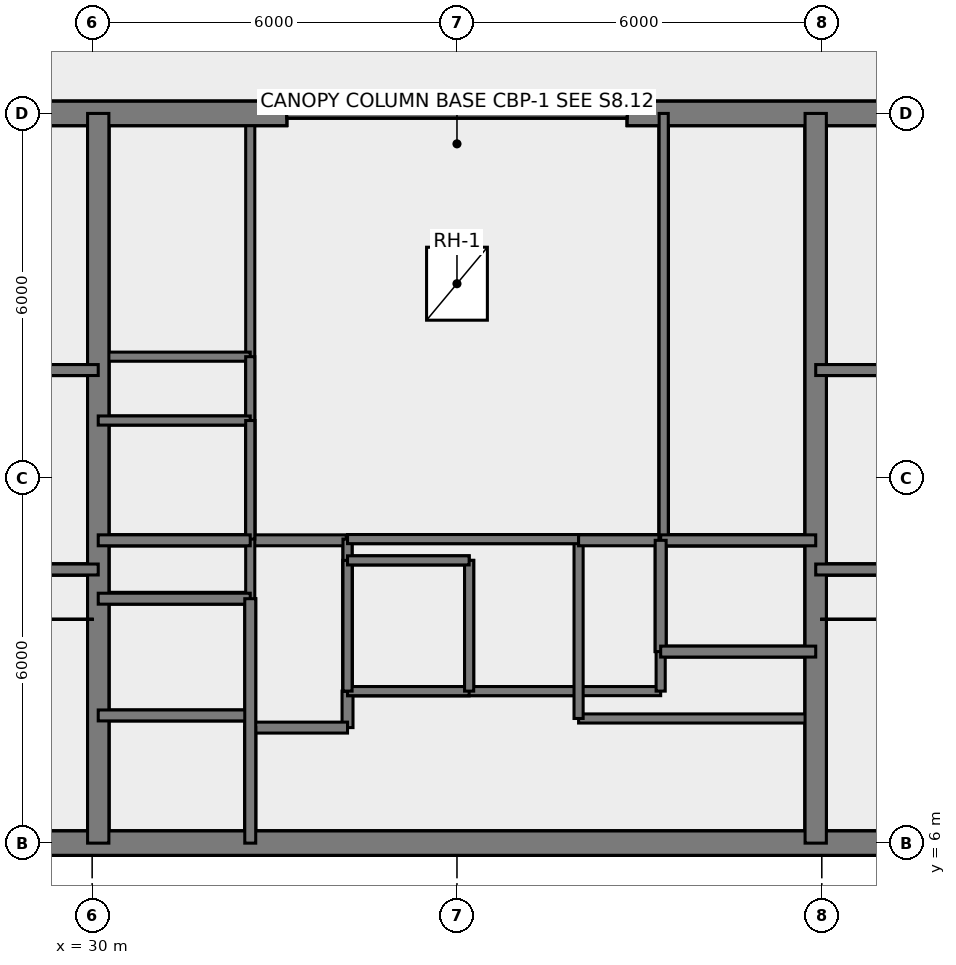
"""IFC4 building model, lengths in metres.
Left out: names, types, materials, properties, quantities, classifications, styles, units other than length and angle.
Written with IfcOpenShell. Run it as: python <this file> out.ifc"""

import sys

from ifc_helpers import new_model, si_unit, direction, frame, frame_2d, origin, origin_2d, place, context, subcontext, project, spatial, rectangle, extrude, source, transform, mapped, element, fill, save


model = new_model("IFC4")
c1 = context("Model", 3, precision=1e-05, world=origin(), true_north=direction((0.0, 1.0)))
c2 = subcontext(c1, "Body", "Model", "MODEL_VIEW")
j1 = project(units=[si_unit("LENGTHUNIT", "METRE"), si_unit("PLANEANGLEUNIT", "RADIAN")], contexts=[c1])
p1 = place(None, origin())
s1 = spatial("IfcSite", under=j1, at=p1, CompositionType="ELEMENT")
p2 = place(p1, origin())
s2 = spatial("IfcBuilding", under=s1, at=p2, CompositionType="ELEMENT")
p3 = place(p2, frame((0.0, 0.0, 303.84)))
s3 = spatial("IfcBuildingStorey", under=s2, at=p3, CompositionType="ELEMENT", Elevation=303.84)
m1 = source(origin(), c2, "Body", "SweptSolid", [
    extrude(rectangle(XDim=0.6, YDim=0.6, at=origin_2d()), origin(), (0.0, 0.0, 1.0), 3.96),
])
for number, where, z_axis, x_axis in (
    (1, (30.0, 6.0, 0.0), (0.0, 0.0, 1.0), (1.0, 0.0, 0.0)),
    (2, (36.0, 6.0, 0.0), (0.0, 0.0, 1.0), (1.0, 0.0, 0.0)),
    (3, (42.0, 6.0, 0.0), (0.0, 0.0, 1.0), (1.0, 0.0, 0.0)),
    (4, (30.0, 18.0, 0.0), (0.0, 0.0, 1.0), (1.0, 0.0, 0.0)),
    (5, (36.0, 18.0, 0.0), (0.0, 0.0, 1.0), (1.0, 0.0, 0.0)),
    (6, (42.0, 18.0, 0.0), (0.0, 0.0, 1.0), (1.0, 0.0, 0.0)),
):
    element("IfcColumn", number, at=place(p3, frame(where, z_axis=z_axis, x_axis=x_axis)), inside=s3, PredefinedType="COLUMN", context=c2, shape_type="MappedRepresentation", body=[
        mapped(m1, transform((0.0, 0.0, 0.0), x_axis=(1.0, 0.0, 0.0), y_axis=(0.0, 1.0, 0.0), z_axis=(0.0, 0.0, 1.0), scale=1.0)),
    ])
p4 = place(p3, frame((48.2, 6.0, 0.0), z_axis=(0.0, 0.0, 1.0), x_axis=(-1.0, 0.0, 0.0)))
e7 = element("IfcWall", 7, at=p4, inside=s3, PredefinedType="SHEAR", context=c2, shape_type="SweptSolid", body=[
    extrude(rectangle(XDim=24.4, YDim=0.4, at=frame_2d((12.2, 0.0))), origin(), (0.0, 0.0, 1.0), 3.96),
])
p5 = place(p3, frame((23.8, 18.0, 0.0), z_axis=(0.0, 0.0, 1.0), x_axis=(1.0, 0.0, 0.0)))
e8 = element("IfcWall", 8, at=p5, inside=s3, PredefinedType="SHEAR", context=c2, shape_type="SweptSolid", body=[
    extrude(rectangle(XDim=9.4, YDim=0.4, at=frame_2d((4.7, 0.0))), origin(), (0.0, 0.0, 1.0), 3.96),
])
p6 = place(p5, frame((2.95, 0.0, 0.0)))
e9 = element("IfcOpeningElement", 9, at=p6, cuts=e8, PredefinedType="OPENING", context=c2, shape_type="SweptSolid", body=[
    extrude(rectangle(XDim=1.1, YDim=2.1, at=origin_2d()), frame((0.55, 0.21, 1.05), z_axis=(0.0, -1.0, 0.0), x_axis=(1.0, 0.0, 0.0)), (0.0, 0.0, 1.0), 0.42),
])
p7 = place(p3, frame((38.8, 18.0, 0.0), z_axis=(0.0, 0.0, 1.0), x_axis=(1.0, 0.0, 0.0)))
e10 = element("IfcWall", 10, at=p7, inside=s3, PredefinedType="SHEAR", context=c2, shape_type="SweptSolid", body=[
    extrude(rectangle(XDim=9.4, YDim=0.4, at=frame_2d((4.7, 0.0))), origin(), (0.0, 0.0, 1.0), 3.96),
])
p8 = place(p7, frame((5.45, 0.0, 0.0)))
e11 = element("IfcOpeningElement", 11, at=p8, cuts=e10, PredefinedType="OPENING", context=c2, shape_type="SweptSolid", body=[
    extrude(rectangle(XDim=1.1, YDim=2.1, at=origin_2d()), frame((0.55, 0.21, 1.05), z_axis=(0.0, -1.0, 0.0), x_axis=(1.0, 0.0, 0.0)), (0.0, 0.0, 1.0), 0.42),
])
for number, where, z_axis, x_axis in (
    (12, (30.1, 6.0, 0.0), (0.0, 0.0, 1.0), (0.0, 1.0, 0.0)),
    (13, (41.9, 18.0, 0.0), (0.0, 0.0, 1.0), (0.0, -1.0, 0.0)),
):
    element("IfcWall", number, at=place(p3, frame(where, z_axis=z_axis, x_axis=x_axis)), inside=s3, PredefinedType="SHEAR", context=c2, shape_type="SweptSolid", body=[
        extrude(rectangle(XDim=12.0, YDim=0.35, at=frame_2d((6.0, 0.0))), origin(), (0.0, 0.0, 1.0), 3.96),
    ])
p9 = place(p3, frame((30.1, 12.95, 0.0), z_axis=(0.0, 0.0, 1.0), x_axis=(1.0, 0.0, 0.0)))
e14 = element("IfcWall", 14, at=p9, inside=s3, PredefinedType="PARTITIONING", context=c2, shape_type="SweptSolid", body=[
    extrude(rectangle(XDim=2.5, YDim=0.15, at=frame_2d((1.25, 0.0))), origin(), (0.0, 0.0, 1.0), 3.68),
])
p10 = place(p3, frame((32.6, 11.0, 0.0), z_axis=(0.0, 0.0, 1.0), x_axis=(0.0, 1.0, 0.0)))
e15 = element("IfcWall", 15, at=p10, inside=s3, PredefinedType="PARTITIONING", context=c2, shape_type="SweptSolid", body=[
    extrude(rectangle(XDim=1.95, YDim=0.15, at=frame_2d((0.975, 0.0))), origin(), (0.0, 0.0, 1.0), 3.68),
])
p11 = place(p10, frame((0.55, 0.0, 0.0)))
e16 = element("IfcOpeningElement", 16, at=p11, cuts=e15, PredefinedType="OPENING", context=c2, shape_type="SweptSolid", body=[
    extrude(rectangle(XDim=0.86, YDim=2.1, at=origin_2d()), frame((0.43, 0.085, 1.05), z_axis=(0.0, -1.0, 0.0), x_axis=(1.0, 0.0, 0.0)), (0.0, 0.0, 1.0), 0.17),
])
p12 = place(p3, frame((34.2, 8.5, 0.0), z_axis=(0.0, 0.0, 1.0), x_axis=(1.0, 0.0, 0.0)))
e17 = element("IfcWall", 17, at=p12, inside=s3, PredefinedType="PARTITIONING", context=c2, shape_type="SweptSolid", body=[
    extrude(rectangle(XDim=2.0, YDim=0.15, at=frame_2d((1.0, 0.0))), origin(), (0.0, 0.0, 1.0), 3.68),
])
p13 = place(p3, frame((34.2, 8.5, 0.0), z_axis=(0.0, 0.0, 1.0), x_axis=(0.0, 1.0, 0.0)))
e18 = element("IfcWall", 18, at=p13, inside=s3, PredefinedType="PARTITIONING", context=c2, shape_type="SweptSolid", body=[
    extrude(rectangle(XDim=2.15, YDim=0.15, at=frame_2d((1.075, 0.0))), origin(), (0.0, 0.0, 1.0), 3.68),
])
p14 = place(p3, frame((36.2, 8.5, 0.0), z_axis=(0.0, 0.0, 1.0), x_axis=(0.0, 1.0, 0.0)))
e19 = element("IfcWall", 19, at=p14, inside=s3, PredefinedType="PARTITIONING", context=c2, shape_type="SweptSolid", body=[
    extrude(rectangle(XDim=2.15, YDim=0.15, at=frame_2d((1.075, 0.0))), origin(), (0.0, 0.0, 1.0), 2.895),
])
p15 = place(p3, frame((34.2, 10.65, 0.0), z_axis=(0.0, 0.0, 1.0), x_axis=(1.0, 0.0, 0.0)))
e20 = element("IfcWall", 20, at=p15, inside=s3, PredefinedType="PARTITIONING", context=c2, shape_type="SweptSolid", body=[
    extrude(rectangle(XDim=2.0, YDim=0.15, at=frame_2d((1.0, 0.0))), origin(), (0.0, 0.0, 1.0), 3.68),
])
p16 = place(p15, frame((0.55, 0.0, 0.0)))
e21 = element("IfcOpeningElement", 21, at=p16, cuts=e20, PredefinedType="OPENING", context=c2, shape_type="SweptSolid", body=[
    extrude(rectangle(XDim=0.86, YDim=2.1, at=origin_2d()), frame((0.43, 0.085, 1.05), z_axis=(0.0, -1.0, 0.0), x_axis=(1.0, 0.0, 0.0)), (0.0, 0.0, 1.0), 0.17),
])
p17 = place(p3, frame((39.4, 11.0, 0.0), z_axis=(0.0, 0.0, 1.0), x_axis=(0.0, 1.0, 0.0)))
e22 = element("IfcWall", 22, at=p17, inside=s3, PredefinedType="PARTITIONING", context=c2, shape_type="SweptSolid", body=[
    extrude(rectangle(XDim=7.0, YDim=0.15, at=frame_2d((3.5, 0.0))), origin(), (0.0, 0.0, 1.0), 3.68),
])
p18 = place(p17, frame((2.4, 0.0, 0.0)))
e23 = element("IfcOpeningElement", 23, at=p18, cuts=e22, PredefinedType="OPENING", context=c2, shape_type="SweptSolid", body=[
    extrude(rectangle(XDim=1.1, YDim=2.1, at=origin_2d()), frame((0.55, 0.085, 1.05), z_axis=(0.0, -1.0, 0.0), x_axis=(1.0, 0.0, 0.0)), (0.0, 0.0, 1.0), 0.17),
])
p19 = place(p3, frame((30.1, 10.98, 0.0), z_axis=(0.0, 0.0, 1.0), x_axis=(1.0, 0.0, 0.0)))
e24 = element("IfcWall", 24, at=p19, inside=s3, PredefinedType="PARTITIONING", context=c2, shape_type="SweptSolid", body=[
    extrude(rectangle(XDim=2.5, YDim=0.18, at=frame_2d((1.25, 0.0))), origin(), (0.0, 0.0, 1.0), 3.68),
])
p20 = place(p3, frame((39.35, 10.98, 0.0), z_axis=(0.0, 0.0, 1.0), x_axis=(1.0, 0.0, 0.0)))
e25 = element("IfcWall", 25, at=p20, inside=s3, PredefinedType="PARTITIONING", context=c2, shape_type="SweptSolid", body=[
    extrude(rectangle(XDim=2.55, YDim=0.18, at=frame_2d((1.275, 0.0))), origin(), (0.0, 0.0, 1.0), 3.68),
])
for number, where, z_axis, x_axis in (
    (26, (30.1, 8.1, 0.0), (0.0, 0.0, 1.0), (1.0, 0.0, 0.0)),
    (27, (30.1, 10.02, 0.0), (0.0, 0.0, 1.0), (1.0, 0.0, 0.0)),
):
    element("IfcWall", number, at=place(p3, frame(where, z_axis=z_axis, x_axis=x_axis)), inside=s3, PredefinedType="PARTITIONING", context=c2, shape_type="SweptSolid", body=[
        extrude(rectangle(XDim=2.5, YDim=0.18, at=frame_2d((1.25, 0.0))), origin(), (0.0, 0.0, 1.0), 3.68),
    ])
p21 = place(p3, frame((32.6, 6.0, 0.0), z_axis=(0.0, 0.0, 1.0), x_axis=(0.0, 1.0, 0.0)))
e28 = element("IfcWall", 28, at=p21, inside=s3, PredefinedType="PARTITIONING", context=c2, shape_type="SweptSolid", body=[
    extrude(rectangle(XDim=4.02, YDim=0.18, at=frame_2d((2.01, 0.0))), origin(), (0.0, 0.0, 1.0), 3.68),
])
p22 = place(p21, frame((0.7, 0.0, 0.0)))
e29 = element("IfcOpeningElement", 29, at=p22, cuts=e28, PredefinedType="OPENING", context=c2, shape_type="SweptSolid", body=[
    extrude(rectangle(XDim=0.86, YDim=2.1, at=origin_2d()), frame((0.43, 0.1, 1.05), z_axis=(0.0, -1.0, 0.0), x_axis=(1.0, 0.0, 0.0)), (0.0, 0.0, 1.0), 0.2),
])
p23 = place(p21, frame((2.62, 0.0, 0.0)))
e30 = element("IfcOpeningElement", 30, at=p23, cuts=e28, PredefinedType="OPENING", context=c2, shape_type="SweptSolid", body=[
    extrude(rectangle(XDim=0.86, YDim=2.1, at=origin_2d()), frame((0.43, 0.1, 1.05), z_axis=(0.0, -1.0, 0.0), x_axis=(1.0, 0.0, 0.0)), (0.0, 0.0, 1.0), 0.2),
])
p24 = place(p3, frame((39.35, 9.15, 0.0), z_axis=(0.0, 0.0, 1.0), x_axis=(0.0, 1.0, 0.0)))
e31 = element("IfcWall", 31, at=p24, inside=s3, PredefinedType="PARTITIONING", context=c2, shape_type="SweptSolid", body=[
    extrude(rectangle(XDim=1.83, YDim=0.18, at=frame_2d((0.915, 0.0))), origin(), (0.0, 0.0, 1.0), 3.68),
])
p25 = place(p3, frame((39.35, 9.15, 0.0), z_axis=(0.0, 0.0, 1.0), x_axis=(1.0, 0.0, 0.0)))
e32 = element("IfcWall", 32, at=p25, inside=s3, PredefinedType="PARTITIONING", context=c2, shape_type="SweptSolid", body=[
    extrude(rectangle(XDim=2.55, YDim=0.18, at=frame_2d((1.275, 0.0))), origin(), (0.0, 0.0, 1.0), 3.68),
])
p26 = place(p25, frame((0.85, 0.0, 0.0)))
e33 = element("IfcOpeningElement", 33, at=p26, cuts=e32, PredefinedType="OPENING", context=c2, shape_type="SweptSolid", body=[
    extrude(rectangle(XDim=0.86, YDim=2.1, at=origin_2d()), frame((0.43, 0.1, 1.05), z_axis=(0.0, -1.0, 0.0), x_axis=(1.0, 0.0, 0.0)), (0.0, 0.0, 1.0), 0.2),
])
p27 = place(p3, frame((33.2, 18.0, 0.0), z_axis=(0.0, 0.0, 1.0), x_axis=(1.0, 0.0, 0.0)))
e34 = element("IfcWall", 34, at=p27, inside=s3, PredefinedType="PARTITIONING", context=c2, shape_type="SweptSolid", body=[
    extrude(rectangle(XDim=5.6, YDim=0.15, at=frame_2d((2.8, 0.0))), origin(), (0.0, 0.0, 1.0), 2.695),
])
p28 = place(p27, frame((0.19, 0.0, 0.0)))
e35 = element("IfcOpeningElement", 35, at=p28, cuts=e34, PredefinedType="OPENING", context=c2, shape_type="SweptSolid", body=[
    extrude(rectangle(XDim=1.1, YDim=2.1, at=origin_2d()), frame((0.55, 0.085, 1.05), z_axis=(0.0, -1.0, 0.0), x_axis=(1.0, 0.0, 0.0)), (0.0, 0.0, 1.0), 0.17),
])
p29 = place(p27, frame((4.31, 0.0, 0.0)))
e36 = element("IfcOpeningElement", 36, at=p29, cuts=e34, PredefinedType="OPENING", context=c2, shape_type="SweptSolid", body=[
    extrude(rectangle(XDim=1.1, YDim=2.1, at=origin_2d()), frame((0.55, 0.085, 1.05), z_axis=(0.0, -1.0, 0.0), x_axis=(1.0, 0.0, 0.0)), (0.0, 0.0, 1.0), 0.17),
])
p30 = place(p3, frame((24.0, 13.78, 0.0), z_axis=(0.0, 0.0, 1.0), x_axis=(1.0, 0.0, 0.0)))
e37 = element("IfcWall", 37, at=p30, inside=s3, PredefinedType="PARTITIONING", context=c2, shape_type="SweptSolid", body=[
    extrude(rectangle(XDim=6.1, YDim=0.18, at=frame_2d((3.05, 0.0))), origin(), (0.0, 0.0, 1.0), 3.68),
])
p31 = place(p30, frame((1.15, 0.0, 0.0)))
e38 = element("IfcOpeningElement", 38, at=p31, cuts=e37, PredefinedType="OPENING", context=c2, shape_type="SweptSolid", body=[
    extrude(rectangle(XDim=1.1, YDim=2.1, at=origin_2d()), frame((0.55, 0.1, 1.05), z_axis=(0.0, -1.0, 0.0), x_axis=(1.0, 0.0, 0.0)), (0.0, 0.0, 1.0), 0.2),
])
p32 = place(p30, frame((4.4, 0.0, 0.0)))
e39 = element("IfcOpeningElement", 39, at=p32, cuts=e37, PredefinedType="OPENING", context=c2, shape_type="SweptSolid", body=[
    extrude(rectangle(XDim=1.1, YDim=2.1, at=origin_2d()), frame((0.55, 0.1, 1.05), z_axis=(0.0, -1.0, 0.0), x_axis=(1.0, 0.0, 0.0)), (0.0, 0.0, 1.0), 0.2),
])
p33 = place(p3, frame((28.15, 10.5, 0.0), z_axis=(0.0, 0.0, 1.0), x_axis=(1.0, 0.0, 0.0)))
e40 = element("IfcWall", 40, at=p33, inside=s3, PredefinedType="PARTITIONING", context=c2, shape_type="SweptSolid", body=[
    extrude(rectangle(XDim=1.95, YDim=0.18, at=frame_2d((0.975, 0.0))), origin(), (0.0, 0.0, 1.0), 3.68),
])
p34 = place(p33, frame((0.65, 0.0, 0.0)))
e41 = element("IfcOpeningElement", 41, at=p34, cuts=e40, PredefinedType="OPENING", context=c2, shape_type="SweptSolid", body=[
    extrude(rectangle(XDim=0.76, YDim=2.05, at=origin_2d()), frame((0.38, 0.1, 1.025), z_axis=(0.0, -1.0, 0.0), x_axis=(1.0, 0.0, 0.0)), (0.0, 0.0, 1.0), 0.2),
])
p35 = place(p3, frame((41.9, 13.78, 0.0), z_axis=(0.0, 0.0, 1.0), x_axis=(1.0, 0.0, 0.0)))
e42 = element("IfcWall", 42, at=p35, inside=s3, PredefinedType="PARTITIONING", context=c2, shape_type="SweptSolid", body=[
    extrude(rectangle(XDim=6.1, YDim=0.18, at=frame_2d((3.05, 0.0))), origin(), (0.0, 0.0, 1.0), 3.68),
])
p36 = place(p35, frame((0.6, 0.0, 0.0)))
e43 = element("IfcOpeningElement", 43, at=p36, cuts=e42, PredefinedType="OPENING", context=c2, shape_type="SweptSolid", body=[
    extrude(rectangle(XDim=1.1, YDim=2.1, at=origin_2d()), frame((0.55, 0.1, 1.05), z_axis=(0.0, -1.0, 0.0), x_axis=(1.0, 0.0, 0.0)), (0.0, 0.0, 1.0), 0.2),
])
p37 = place(p35, frame((3.8, 0.0, 0.0)))
e44 = element("IfcOpeningElement", 44, at=p37, cuts=e42, PredefinedType="OPENING", context=c2, shape_type="SweptSolid", body=[
    extrude(rectangle(XDim=1.1, YDim=2.1, at=origin_2d()), frame((0.55, 0.1, 1.05), z_axis=(0.0, -1.0, 0.0), x_axis=(1.0, 0.0, 0.0)), (0.0, 0.0, 1.0), 0.2),
])
p38 = place(p3, frame((41.9, 10.5, 0.0), z_axis=(0.0, 0.0, 1.0), x_axis=(1.0, 0.0, 0.0)))
e45 = element("IfcWall", 45, at=p38, inside=s3, PredefinedType="PARTITIONING", context=c2, shape_type="SweptSolid", body=[
    extrude(rectangle(XDim=1.95, YDim=0.18, at=frame_2d((0.975, 0.0))), origin(), (0.0, 0.0, 1.0), 3.68),
])
p39 = place(p38, frame((0.65, 0.0, 0.0)))
e46 = element("IfcOpeningElement", 46, at=p39, cuts=e45, PredefinedType="OPENING", context=c2, shape_type="SweptSolid", body=[
    extrude(rectangle(XDim=0.76, YDim=2.05, at=origin_2d()), frame((0.38, 0.1, 1.025), z_axis=(0.0, -1.0, 0.0), x_axis=(1.0, 0.0, 0.0)), (0.0, 0.0, 1.0), 0.2),
])
m2 = source(origin(), c2, "Body", "SweptSolid", [
    extrude(rectangle(XDim=0.86, YDim=2.1, at=origin_2d()), frame((0.43, 0.025, 1.05), z_axis=(0.0, -1.0, 0.0), x_axis=(1.0, 0.0, 0.0)), (0.0, 0.0, 1.0), 0.05),
])
p40 = place(p11, origin())
e47 = element("IfcDoor", 47, at=p40, inside=s3, OperationType="SINGLE_SWING_LEFT", PredefinedType="DOOR", context=c2, shape_type="MappedRepresentation", body=[
    mapped(m2, transform((0.0, 0.0, 0.0), x_axis=(1.0, 0.0, 0.0), y_axis=(0.0, 1.0, 0.0), z_axis=(0.0, 0.0, 1.0), scale=1.0)),
])
fill(e16, e47)
p41 = place(p16, origin())
e48 = element("IfcDoor", 48, at=p41, inside=s3, OperationType="SINGLE_SWING_LEFT", PredefinedType="DOOR", context=c2, shape_type="MappedRepresentation", body=[
    mapped(m2, transform((0.0, 0.0, 0.0), x_axis=(1.0, 0.0, 0.0), y_axis=(0.0, 1.0, 0.0), z_axis=(0.0, 0.0, 1.0), scale=1.0)),
])
fill(e21, e48)
m3 = source(origin(), c2, "Body", "SweptSolid", [
    extrude(rectangle(XDim=1.1, YDim=2.1, at=origin_2d()), frame((0.55, 0.025, 1.05), z_axis=(0.0, -1.0, 0.0), x_axis=(1.0, 0.0, 0.0)), (0.0, 0.0, 1.0), 0.05),
])
p42 = place(p18, origin())
e49 = element("IfcDoor", 49, at=p42, inside=s3, OperationType="SINGLE_SWING_RIGHT", PredefinedType="DOOR", context=c2, shape_type="MappedRepresentation", body=[
    mapped(m3, transform((0.0, 0.0, 0.0), x_axis=(1.0, 0.0, 0.0), y_axis=(0.0, 1.0, 0.0), z_axis=(0.0, 0.0, 1.0), scale=1.0)),
])
fill(e23, e49)
p43 = place(p22, origin())
e50 = element("IfcDoor", 50, at=p43, inside=s3, OperationType="SINGLE_SWING_LEFT", PredefinedType="DOOR", context=c2, shape_type="MappedRepresentation", body=[
    mapped(m2, transform((0.0, 0.0, 0.0), x_axis=(1.0, 0.0, 0.0), y_axis=(0.0, 1.0, 0.0), z_axis=(0.0, 0.0, 1.0), scale=1.0)),
])
fill(e29, e50)
p44 = place(p23, origin())
e51 = element("IfcDoor", 51, at=p44, inside=s3, OperationType="SINGLE_SWING_RIGHT", PredefinedType="DOOR", context=c2, shape_type="MappedRepresentation", body=[
    mapped(m2, transform((0.0, 0.0, 0.0), x_axis=(1.0, 0.0, 0.0), y_axis=(0.0, 1.0, 0.0), z_axis=(0.0, 0.0, 1.0), scale=1.0)),
])
fill(e30, e51)
p45 = place(p26, origin())
e52 = element("IfcDoor", 52, at=p45, inside=s3, OperationType="SINGLE_SWING_LEFT", PredefinedType="DOOR", context=c2, shape_type="MappedRepresentation", body=[
    mapped(m2, transform((0.0, 0.0, 0.0), x_axis=(1.0, 0.0, 0.0), y_axis=(0.0, 1.0, 0.0), z_axis=(0.0, 0.0, 1.0), scale=1.0)),
])
fill(e33, e52)
m4 = source(origin(), c2, "Body", "SweptSolid", [
    extrude(rectangle(XDim=1.1, YDim=2.1, at=origin_2d()), frame((0.55, 0.025, 1.05), z_axis=(0.0, -1.0, 0.0), x_axis=(1.0, 0.0, 0.0)), (0.0, 0.0, 1.0), 0.05),
])
p46 = place(p28, origin())
e53 = element("IfcDoor", 53, at=p46, inside=s3, OperationType="SINGLE_SWING_LEFT", PredefinedType="DOOR", context=c2, shape_type="MappedRepresentation", body=[
    mapped(m4, transform((0.0, 0.0, 0.0), x_axis=(1.0, 0.0, 0.0), y_axis=(0.0, 1.0, 0.0), z_axis=(0.0, 0.0, 1.0), scale=1.0)),
])
fill(e35, e53)
p47 = place(p29, origin())
e54 = element("IfcDoor", 54, at=p47, inside=s3, OperationType="SINGLE_SWING_RIGHT", PredefinedType="DOOR", context=c2, shape_type="MappedRepresentation", body=[
    mapped(m4, transform((0.0, 0.0, 0.0), x_axis=(1.0, 0.0, 0.0), y_axis=(0.0, 1.0, 0.0), z_axis=(0.0, 0.0, 1.0), scale=1.0)),
])
fill(e36, e54)
m5 = source(origin(), c2, "Body", "SweptSolid", [
    extrude(rectangle(XDim=1.1, YDim=2.1, at=origin_2d()), frame((0.55, 0.025, 1.05), z_axis=(0.0, -1.0, 0.0), x_axis=(1.0, 0.0, 0.0)), (0.0, 0.0, 1.0), 0.05),
])
p48 = place(p32, origin())
e55 = element("IfcDoor", 55, at=p48, inside=s3, OperationType="SLIDING_TO_LEFT", PredefinedType="DOOR", context=c2, shape_type="MappedRepresentation", body=[
    mapped(m5, transform((0.0, 0.0, 0.0), x_axis=(1.0, 0.0, 0.0), y_axis=(0.0, 1.0, 0.0), z_axis=(0.0, 0.0, 1.0), scale=1.0)),
])
fill(e39, e55)
m6 = source(origin(), c2, "Body", "SweptSolid", [
    extrude(rectangle(XDim=0.76, YDim=2.05, at=origin_2d()), frame((0.38, 0.025, 1.025), z_axis=(0.0, -1.0, 0.0), x_axis=(1.0, 0.0, 0.0)), (0.0, 0.0, 1.0), 0.05),
])
p49 = place(p34, origin())
e56 = element("IfcDoor", 56, at=p49, inside=s3, OperationType="SINGLE_SWING_LEFT", PredefinedType="DOOR", context=c2, shape_type="MappedRepresentation", body=[
    mapped(m6, transform((0.0, 0.0, 0.0), x_axis=(1.0, 0.0, 0.0), y_axis=(0.0, 1.0, 0.0), z_axis=(0.0, 0.0, 1.0), scale=1.0)),
])
fill(e41, e56)
p50 = place(p36, origin())
e57 = element("IfcDoor", 57, at=p50, inside=s3, OperationType="SLIDING_TO_RIGHT", PredefinedType="DOOR", context=c2, shape_type="MappedRepresentation", body=[
    mapped(m5, transform((0.0, 0.0, 0.0), x_axis=(1.0, 0.0, 0.0), y_axis=(0.0, 1.0, 0.0), z_axis=(0.0, 0.0, 1.0), scale=1.0)),
])
fill(e43, e57)
p51 = place(p39, origin())
e58 = element("IfcDoor", 58, at=p51, inside=s3, OperationType="SINGLE_SWING_RIGHT", PredefinedType="DOOR", context=c2, shape_type="MappedRepresentation", body=[
    mapped(m6, transform((0.0, 0.0, 0.0), x_axis=(1.0, 0.0, 0.0), y_axis=(0.0, 1.0, 0.0), z_axis=(0.0, 0.0, 1.0), scale=1.0)),
])
fill(e46, e58)
save(model, sys.argv[1])
